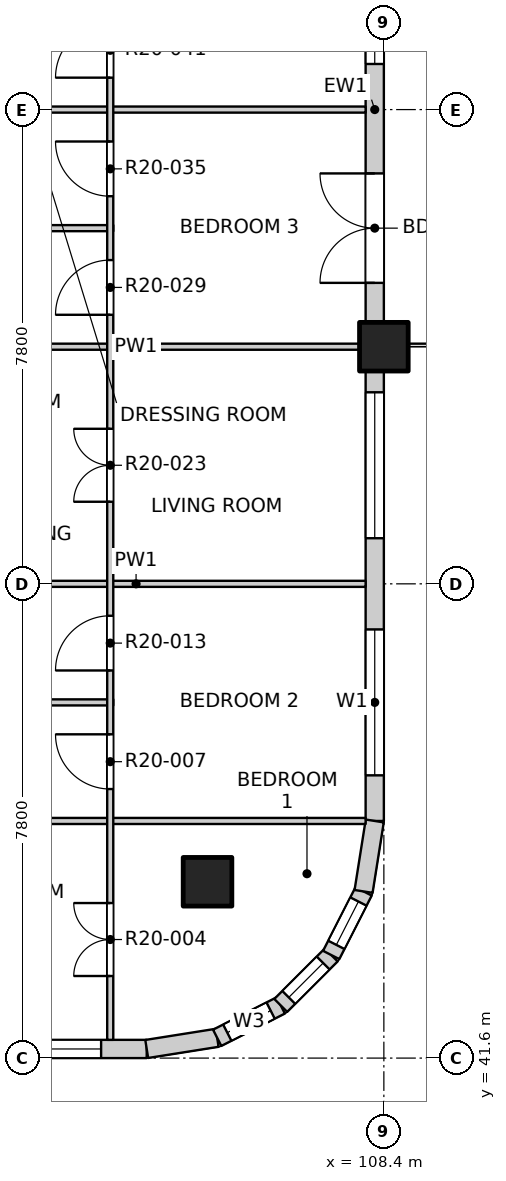
"""IFC4 building model, lengths in metres.
Left out: names, types, materials, properties, quantities, classifications, styles, units other than length and angle.
Written with IfcOpenShell. Run it as: python <this file> out.ifc"""

import sys

from ifc_helpers import new_model, si_unit, direction, frame, frame_2d, origin, origin_2d, place, context, subcontext, project, spatial, rectangle, extrude, element, fill, save


model = new_model("IFC4")
c1 = context("Model", 3, precision=1e-05, world=origin(), true_north=direction((0.0, 1.0)))
c2 = subcontext(c1, "Body", "Model", "MODEL_VIEW")
j1 = project(units=[si_unit("LENGTHUNIT", "METRE"), si_unit("PLANEANGLEUNIT", "RADIAN")], contexts=[c1])
p1 = place(None, origin())
s1 = spatial("IfcSite", under=j1, at=p1, CompositionType="ELEMENT")
p2 = place(p1, origin())
s2 = spatial("IfcBuilding", under=s1, at=p2, CompositionType="ELEMENT")
p3 = place(p2, frame((0.0, 0.0, 210.9)))
s3 = spatial("IfcBuildingStorey", under=s2, at=p3, CompositionType="ELEMENT", Elevation=210.9)
for number, where, z_axis, x_axis in (
    (1, (105.5, 44.5, -0.25), (0.0, 0.0, 1.0), (1.0, 0.0, 0.0)),
    (2, (108.4, 53.3, -0.25), (0.0, 0.0, 1.0), (1.0, 0.0, 0.0)),
):
    element("IfcColumn", number, at=place(p3, frame(where, z_axis=z_axis, x_axis=x_axis)), inside=s3, PredefinedType="COLUMN", context=c2, shape_type="SweptSolid", body=[
        extrude(rectangle(XDim=0.8, YDim=0.8, at=origin_2d()), origin(), (0.0, 0.0, 1.0), 3.4),
    ])
p4 = place(p3, frame((97.1, 41.75, 0.0), z_axis=(0.0, 0.0, 1.0), x_axis=(1.0, 0.0, 0.0)))
e3 = element("IfcWall", 3, at=p4, inside=s3, PredefinedType="SOLIDWALL", context=c2, shape_type="SweptSolid", body=[
    extrude(rectangle(XDim=7.4, YDim=0.3, at=frame_2d((3.7, 0.0))), origin(), (0.0, 0.0, 1.0), 2.7),
])
p5 = place(p4, frame((0.35, 0.0, 0.9)))
e4 = element("IfcOpeningElement", 4, at=p5, cuts=e3, PredefinedType="OPENING", context=c2, shape_type="SweptSolid", body=[
    extrude(rectangle(XDim=2.4, YDim=1.8, at=frame_2d((1.2, 0.9))), frame((0.0, 0.16, 0.0), z_axis=(0.0, -1.0, 0.0), x_axis=(1.0, 0.0, 0.0)), (0.0, 0.0, 1.0), 0.32),
])
p6 = place(p4, frame((4.25, 0.0, 0.9)))
e5 = element("IfcOpeningElement", 5, at=p6, cuts=e3, PredefinedType="OPENING", context=c2, shape_type="SweptSolid", body=[
    extrude(rectangle(XDim=2.4, YDim=1.8, at=frame_2d((1.2, 0.9))), frame((0.0, 0.16, 0.0), z_axis=(0.0, -1.0, 0.0), x_axis=(1.0, 0.0, 0.0)), (0.0, 0.0, 1.0), 0.32),
])
p7 = place(p3, frame((108.25, 45.5, 0.0), z_axis=(0.0, 0.0, 1.0), x_axis=(0.0, 1.0, 0.0)))
e6 = element("IfcWall", 6, at=p7, inside=s3, PredefinedType="SOLIDWALL", context=c2, shape_type="SweptSolid", body=[
    extrude(rectangle(XDim=7.4, YDim=0.3, at=frame_2d((3.7, 0.0))), origin(), (0.0, 0.0, 1.0), 2.7),
])
p8 = place(p7, frame((0.75, 0.0, 0.9)))
e7 = element("IfcOpeningElement", 7, at=p8, cuts=e6, PredefinedType="OPENING", context=c2, shape_type="SweptSolid", body=[
    extrude(rectangle(XDim=2.4, YDim=1.8, at=frame_2d((1.2, 0.9))), frame((0.0, 0.16, 0.0), z_axis=(0.0, -1.0, 0.0), x_axis=(1.0, 0.0, 0.0)), (0.0, 0.0, 1.0), 0.32),
])
p9 = place(p7, frame((4.65, 0.0, 0.9)))
e8 = element("IfcOpeningElement", 8, at=p9, cuts=e6, PredefinedType="OPENING", context=c2, shape_type="SweptSolid", body=[
    extrude(rectangle(XDim=2.4, YDim=1.8, at=frame_2d((1.2, 0.9))), frame((0.0, 0.16, 0.0), z_axis=(0.0, -1.0, 0.0), x_axis=(1.0, 0.0, 0.0)), (0.0, 0.0, 1.0), 0.32),
])
p10 = place(p3, frame((108.25, 53.7, 0.0), z_axis=(0.0, 0.0, 1.0), x_axis=(0.0, 1.0, 0.0)))
e9 = element("IfcWall", 9, at=p10, inside=s3, PredefinedType="SOLIDWALL", context=c2, shape_type="SweptSolid", body=[
    extrude(rectangle(XDim=7.0, YDim=0.3, at=frame_2d((3.5, 0.0))), origin(), (0.0, 0.0, 1.0), 2.7),
])
p11 = place(p10, frame((0.65, 0.0, 0.0)))
e10 = element("IfcOpeningElement", 10, at=p11, cuts=e9, PredefinedType="OPENING", context=c2, shape_type="SweptSolid", body=[
    extrude(rectangle(XDim=1.8, YDim=2.4, at=frame_2d((0.9, 1.2))), frame((0.0, 0.16, 0.0), z_axis=(0.0, -1.0, 0.0), x_axis=(1.0, 0.0, 0.0)), (0.0, 0.0, 1.0), 0.32),
])
p12 = place(p10, frame((4.25, 0.0, 0.9)))
e11 = element("IfcOpeningElement", 11, at=p12, cuts=e9, PredefinedType="OPENING", context=c2, shape_type="SweptSolid", body=[
    extrude(rectangle(XDim=2.4, YDim=1.8, at=frame_2d((1.2, 0.9))), frame((0.0, 0.16, 0.0), z_axis=(0.0, -1.0, 0.0), x_axis=(1.0, 0.0, 0.0)), (0.0, 0.0, 1.0), 0.32),
])
p13 = place(p3, frame((104.5, 41.75, 0.0), z_axis=(0.0, 0.0, 1.0), x_axis=(0.987678452879, 0.156496880861, 0.0)))
e12 = element("IfcWall", 12, at=p13, inside=s3, PredefinedType="SOLIDWALL", context=c2, shape_type="SweptSolid", body=[
    extrude(rectangle(XDim=1.173, YDim=0.3, at=frame_2d((0.586, 0.0))), origin(), (0.0, 0.0, 1.0), 2.7),
])
p14 = place(p3, frame((105.659, 41.934, 0.0), z_axis=(0.0, 0.0, 1.0), x_axis=(0.890988677504, 0.454025524128, 0.0)))
e13 = element("IfcWall", 13, at=p14, inside=s3, PredefinedType="SOLIDWALL", context=c2, shape_type="SweptSolid", body=[
    extrude(rectangle(XDim=1.173, YDim=0.3, at=frame_2d((0.587, 0.0))), origin(), (0.0, 0.0, 1.0), 2.7),
])
p15 = place(p14, frame((0.187, 0.0, 0.9)))
e14 = element("IfcOpeningElement", 14, at=p15, cuts=e13, PredefinedType="OPENING", context=c2, shape_type="SweptSolid", body=[
    extrude(rectangle(XDim=0.8, YDim=1.2, at=frame_2d((0.4, 0.6))), frame((0.0, 0.16, 0.0), z_axis=(0.0, -1.0, 0.0), x_axis=(1.0, 0.0, 0.0)), (0.0, 0.0, 1.0), 0.32),
])
p16 = place(p3, frame((106.704, 42.466, 0.0), z_axis=(0.0, 0.0, 1.0), x_axis=(0.707106781187, 0.707106781187, 0.0)))
e15 = element("IfcWall", 15, at=p16, inside=s3, PredefinedType="SOLIDWALL", context=c2, shape_type="SweptSolid", body=[
    extrude(rectangle(XDim=1.173, YDim=0.3, at=frame_2d((0.586, 0.0))), origin(), (0.0, 0.0, 1.0), 2.7),
])
p17 = place(p16, frame((0.187, 0.0, 0.9)))
e16 = element("IfcOpeningElement", 16, at=p17, cuts=e15, PredefinedType="OPENING", context=c2, shape_type="SweptSolid", body=[
    extrude(rectangle(XDim=0.8, YDim=1.2, at=frame_2d((0.4, 0.6))), frame((0.0, 0.16, 0.0), z_axis=(0.0, -1.0, 0.0), x_axis=(1.0, 0.0, 0.0)), (0.0, 0.0, 1.0), 0.32),
])
p18 = place(p3, frame((107.534, 43.296, 0.0), z_axis=(0.0, 0.0, 1.0), x_axis=(0.454025524128, 0.890988677504, 0.0)))
e17 = element("IfcWall", 17, at=p18, inside=s3, PredefinedType="SOLIDWALL", context=c2, shape_type="SweptSolid", body=[
    extrude(rectangle(XDim=1.173, YDim=0.3, at=frame_2d((0.587, 0.0))), origin(), (0.0, 0.0, 1.0), 2.7),
])
p19 = place(p18, frame((0.187, 0.0, 0.9)))
e18 = element("IfcOpeningElement", 18, at=p19, cuts=e17, PredefinedType="OPENING", context=c2, shape_type="SweptSolid", body=[
    extrude(rectangle(XDim=0.8, YDim=1.2, at=frame_2d((0.4, 0.6))), frame((0.0, 0.16, 0.0), z_axis=(0.0, -1.0, 0.0), x_axis=(1.0, 0.0, 0.0)), (0.0, 0.0, 1.0), 0.32),
])
p20 = place(p3, frame((108.066, 44.341, 0.0), z_axis=(0.0, 0.0, 1.0), x_axis=(0.156496880861, 0.987678452879, 0.0)))
e19 = element("IfcWall", 19, at=p20, inside=s3, PredefinedType="SOLIDWALL", context=c2, shape_type="SweptSolid", body=[
    extrude(rectangle(XDim=1.173, YDim=0.3, at=frame_2d((0.586, 0.0))), origin(), (0.0, 0.0, 1.0), 2.7),
])
p21 = place(p3, frame((96.625, 45.5, 0.0), z_axis=(0.0, 0.0, 1.0), x_axis=(1.0, 0.0, 0.0)))
e20 = element("IfcWall", 20, at=p21, inside=s3, PredefinedType="PARTITIONING", context=c2, shape_type="SweptSolid", body=[
    extrude(rectangle(XDim=11.475, YDim=0.1, at=frame_2d((5.738, 0.0))), origin(), (0.0, 0.0, 1.0), 3.15),
])
p22 = place(p21, frame((2.61, 0.0, 0.0)))
e21 = element("IfcOpeningElement", 21, at=p22, cuts=e20, PredefinedType="OPENING", context=c2, shape_type="SweptSolid", body=[
    extrude(rectangle(XDim=0.9, YDim=2.1, at=frame_2d((0.45, 1.05))), frame((0.0, 0.06, 0.0), z_axis=(0.0, -1.0, 0.0), x_axis=(1.0, 0.0, 0.0)), (0.0, 0.0, 1.0), 0.12),
])
p23 = place(p3, frame((100.55, 47.45, 0.0), z_axis=(0.0, 0.0, 1.0), x_axis=(1.0, 0.0, 0.0)))
e22 = element("IfcWall", 22, at=p23, inside=s3, PredefinedType="PARTITIONING", context=c2, shape_type="SweptSolid", body=[
    extrude(rectangle(XDim=3.4, YDim=0.1, at=frame_2d((1.7, 0.0))), origin(), (0.0, 0.0, 1.0), 3.15),
])
for number, where, z_axis, x_axis in (
    (23, (100.55, 49.4, 0.0), (0.0, 0.0, 1.0), (1.0, 0.0, 0.0)),
    (24, (100.55, 53.3, 0.0), (0.0, 0.0, 1.0), (1.0, 0.0, 0.0)),
):
    element("IfcWall", number, at=place(p3, frame(where, z_axis=z_axis, x_axis=x_axis)), inside=s3, PredefinedType="PARTITIONING", context=c2, shape_type="SweptSolid", body=[
        extrude(rectangle(XDim=7.55, YDim=0.1, at=frame_2d((3.775, 0.0))), origin(), (0.0, 0.0, 1.0), 3.15),
    ])
p24 = place(p3, frame((100.55, 55.25, 0.0), z_axis=(0.0, 0.0, 1.0), x_axis=(1.0, 0.0, 0.0)))
e25 = element("IfcWall", 25, at=p24, inside=s3, PredefinedType="PARTITIONING", context=c2, shape_type="SweptSolid", body=[
    extrude(rectangle(XDim=3.4, YDim=0.1, at=frame_2d((1.7, 0.0))), origin(), (0.0, 0.0, 1.0), 3.15),
])
p25 = place(p3, frame((100.55, 57.2, 0.0), z_axis=(0.0, 0.0, 1.0), x_axis=(1.0, 0.0, 0.0)))
e26 = element("IfcWall", 26, at=p25, inside=s3, PredefinedType="PARTITIONING", context=c2, shape_type="SweptSolid", body=[
    extrude(rectangle(XDim=7.55, YDim=0.1, at=frame_2d((3.775, 0.0))), origin(), (0.0, 0.0, 1.0), 3.15),
])
p26 = place(p3, frame((103.9, 41.9, 0.0), z_axis=(0.0, 0.0, 1.0), x_axis=(0.0, 1.0, 0.0)))
e27 = element("IfcWall", 27, at=p26, inside=s3, PredefinedType="PARTITIONING", context=c2, shape_type="SweptSolid", body=[
    extrude(rectangle(XDim=19.1, YDim=0.1, at=frame_2d((9.55, 0.0))), origin(), (0.0, 0.0, 1.0), 3.15),
])
p27 = place(p26, frame((1.05, 0.0, 0.0)))
e28 = element("IfcOpeningElement", 28, at=p27, cuts=e27, PredefinedType="OPENING", context=c2, shape_type="SweptSolid", body=[
    extrude(rectangle(XDim=1.2, YDim=2.1, at=frame_2d((0.6, 1.05))), frame((0.0, 0.06, 0.0), z_axis=(0.0, -1.0, 0.0), x_axis=(1.0, 0.0, 0.0)), (0.0, 0.0, 1.0), 0.12),
])
p28 = place(p26, frame((4.125, 0.0, 0.0)))
e29 = element("IfcOpeningElement", 29, at=p28, cuts=e27, PredefinedType="OPENING", context=c2, shape_type="SweptSolid", body=[
    extrude(rectangle(XDim=0.9, YDim=2.1, at=frame_2d((0.45, 1.05))), frame((0.0, 0.06, 0.0), z_axis=(0.0, -1.0, 0.0), x_axis=(1.0, 0.0, 0.0)), (0.0, 0.0, 1.0), 0.12),
])
p29 = place(p26, frame((6.075, 0.0, 0.0)))
e30 = element("IfcOpeningElement", 30, at=p29, cuts=e27, PredefinedType="OPENING", context=c2, shape_type="SweptSolid", body=[
    extrude(rectangle(XDim=0.9, YDim=2.1, at=frame_2d((0.45, 1.05))), frame((0.0, 0.06, 0.0), z_axis=(0.0, -1.0, 0.0), x_axis=(1.0, 0.0, 0.0)), (0.0, 0.0, 1.0), 0.12),
])
p30 = place(p26, frame((8.85, 0.0, 0.0)))
e31 = element("IfcOpeningElement", 31, at=p30, cuts=e27, PredefinedType="OPENING", context=c2, shape_type="SweptSolid", body=[
    extrude(rectangle(XDim=1.2, YDim=2.1, at=frame_2d((0.6, 1.05))), frame((0.0, 0.06, 0.0), z_axis=(0.0, -1.0, 0.0), x_axis=(1.0, 0.0, 0.0)), (0.0, 0.0, 1.0), 0.12),
])
p31 = place(p26, frame((11.925, 0.0, 0.0)))
e32 = element("IfcOpeningElement", 32, at=p31, cuts=e27, PredefinedType="OPENING", context=c2, shape_type="SweptSolid", body=[
    extrude(rectangle(XDim=0.9, YDim=2.1, at=frame_2d((0.45, 1.05))), frame((0.0, 0.06, 0.0), z_axis=(0.0, -1.0, 0.0), x_axis=(1.0, 0.0, 0.0)), (0.0, 0.0, 1.0), 0.12),
])
p32 = place(p26, frame((13.875, 0.0, 0.0)))
e33 = element("IfcOpeningElement", 33, at=p32, cuts=e27, PredefinedType="OPENING", context=c2, shape_type="SweptSolid", body=[
    extrude(rectangle(XDim=0.9, YDim=2.1, at=frame_2d((0.45, 1.05))), frame((0.0, 0.06, 0.0), z_axis=(0.0, -1.0, 0.0), x_axis=(1.0, 0.0, 0.0)), (0.0, 0.0, 1.0), 0.12),
])
p33 = place(p26, frame((15.825, 0.0, 0.0)))
e34 = element("IfcOpeningElement", 34, at=p33, cuts=e27, PredefinedType="OPENING", context=c2, shape_type="SweptSolid", body=[
    extrude(rectangle(XDim=0.9, YDim=2.1, at=frame_2d((0.45, 1.05))), frame((0.0, 0.06, 0.0), z_axis=(0.0, -1.0, 0.0), x_axis=(1.0, 0.0, 0.0)), (0.0, 0.0, 1.0), 0.12),
])
p34 = place(p26, frame((17.775, 0.0, 0.0)))
e35 = element("IfcOpeningElement", 35, at=p34, cuts=e27, PredefinedType="OPENING", context=c2, shape_type="SweptSolid", body=[
    extrude(rectangle(XDim=0.9, YDim=2.1, at=frame_2d((0.45, 1.05))), frame((0.0, 0.06, 0.0), z_axis=(0.0, -1.0, 0.0), x_axis=(1.0, 0.0, 0.0)), (0.0, 0.0, 1.0), 0.12),
])
p35 = place(p6, origin())
e36 = element("IfcWindow", 36, at=p35, inside=s3, PartitioningType="DOUBLE_PANEL_VERTICAL", PredefinedType="WINDOW", context=c2, shape_type="SweptSolid", body=[
    extrude(rectangle(XDim=2.4, YDim=1.8, at=frame_2d((1.2, 0.9))), frame((0.0, 0.03, 0.0), z_axis=(0.0, -1.0, 0.0), x_axis=(1.0, 0.0, 0.0)), (0.0, 0.0, 1.0), 0.06),
])
fill(e5, e36)
p36 = place(p8, origin())
e37 = element("IfcWindow", 37, at=p36, inside=s3, PartitioningType="DOUBLE_PANEL_VERTICAL", PredefinedType="WINDOW", context=c2, shape_type="SweptSolid", body=[
    extrude(rectangle(XDim=2.4, YDim=1.8, at=frame_2d((1.2, 0.9))), frame((0.0, 0.03, 0.0), z_axis=(0.0, -1.0, 0.0), x_axis=(1.0, 0.0, 0.0)), (0.0, 0.0, 1.0), 0.06),
])
fill(e7, e37)
p37 = place(p9, origin())
e38 = element("IfcWindow", 38, at=p37, inside=s3, PartitioningType="DOUBLE_PANEL_VERTICAL", PredefinedType="WINDOW", context=c2, shape_type="SweptSolid", body=[
    extrude(rectangle(XDim=2.4, YDim=1.8, at=frame_2d((1.2, 0.9))), frame((0.0, 0.03, 0.0), z_axis=(0.0, -1.0, 0.0), x_axis=(1.0, 0.0, 0.0)), (0.0, 0.0, 1.0), 0.06),
])
fill(e8, e38)
p38 = place(p11, origin())
e39 = element("IfcDoor", 39, at=p38, inside=s3, OperationType="DOUBLE_DOOR_SINGLE_SWING", PredefinedType="DOOR", context=c2, shape_type="SweptSolid", body=[
    extrude(rectangle(XDim=1.8, YDim=2.4, at=frame_2d((0.9, 1.2))), frame((0.0, 0.025, 0.0), z_axis=(0.0, -1.0, 0.0), x_axis=(1.0, 0.0, 0.0)), (0.0, 0.0, 1.0), 0.05),
])
fill(e10, e39)
p39 = place(p12, origin())
e40 = element("IfcWindow", 40, at=p39, inside=s3, PartitioningType="DOUBLE_PANEL_VERTICAL", PredefinedType="WINDOW", context=c2, shape_type="SweptSolid", body=[
    extrude(rectangle(XDim=2.4, YDim=1.8, at=frame_2d((1.2, 0.9))), frame((0.0, 0.03, 0.0), z_axis=(0.0, -1.0, 0.0), x_axis=(1.0, 0.0, 0.0)), (0.0, 0.0, 1.0), 0.06),
])
fill(e11, e40)
p40 = place(p15, origin())
e41 = element("IfcWindow", 41, at=p40, inside=s3, PartitioningType="SINGLE_PANEL", PredefinedType="WINDOW", context=c2, shape_type="SweptSolid", body=[
    extrude(rectangle(XDim=0.8, YDim=1.2, at=frame_2d((0.4, 0.6))), frame((0.0, 0.03, 0.0), z_axis=(0.0, -1.0, 0.0), x_axis=(1.0, 0.0, 0.0)), (0.0, 0.0, 1.0), 0.06),
])
fill(e14, e41)
p41 = place(p17, origin())
e42 = element("IfcWindow", 42, at=p41, inside=s3, PartitioningType="SINGLE_PANEL", PredefinedType="WINDOW", context=c2, shape_type="SweptSolid", body=[
    extrude(rectangle(XDim=0.8, YDim=1.2, at=frame_2d((0.4, 0.6))), frame((0.0, 0.03, 0.0), z_axis=(0.0, -1.0, 0.0), x_axis=(1.0, 0.0, 0.0)), (0.0, 0.0, 1.0), 0.06),
])
fill(e16, e42)
p42 = place(p19, origin())
e43 = element("IfcWindow", 43, at=p42, inside=s3, PartitioningType="SINGLE_PANEL", PredefinedType="WINDOW", context=c2, shape_type="SweptSolid", body=[
    extrude(rectangle(XDim=0.8, YDim=1.2, at=frame_2d((0.4, 0.6))), frame((0.0, 0.03, 0.0), z_axis=(0.0, -1.0, 0.0), x_axis=(1.0, 0.0, 0.0)), (0.0, 0.0, 1.0), 0.06),
])
fill(e18, e43)
p43 = place(p27, origin())
e44 = element("IfcDoor", 44, at=p43, inside=s3, OperationType="DOUBLE_DOOR_SINGLE_SWING", PredefinedType="DOOR", context=c2, shape_type="SweptSolid", body=[
    extrude(rectangle(XDim=1.2, YDim=2.1, at=frame_2d((0.6, 1.05))), frame((0.0, 0.025, 0.0), z_axis=(0.0, -1.0, 0.0), x_axis=(1.0, 0.0, 0.0)), (0.0, 0.0, 1.0), 0.05),
])
fill(e28, e44)
p44 = place(p28, origin())
e45 = element("IfcDoor", 45, at=p44, inside=s3, OperationType="SINGLE_SWING_RIGHT", PredefinedType="DOOR", context=c2, shape_type="SweptSolid", body=[
    extrude(rectangle(XDim=0.9, YDim=2.1, at=frame_2d((0.45, 1.05))), frame((0.0, 0.025, 0.0), z_axis=(0.0, -1.0, 0.0), x_axis=(1.0, 0.0, 0.0)), (0.0, 0.0, 1.0), 0.05),
])
fill(e29, e45)
p45 = place(p29, origin())
e46 = element("IfcDoor", 46, at=p45, inside=s3, OperationType="SINGLE_SWING_LEFT", PredefinedType="DOOR", context=c2, shape_type="SweptSolid", body=[
    extrude(rectangle(XDim=0.9, YDim=2.1, at=frame_2d((0.45, 1.05))), frame((0.0, 0.025, 0.0), z_axis=(0.0, -1.0, 0.0), x_axis=(1.0, 0.0, 0.0)), (0.0, 0.0, 1.0), 0.05),
])
fill(e30, e46)
p46 = place(p30, origin())
e47 = element("IfcDoor", 47, at=p46, inside=s3, OperationType="DOUBLE_DOOR_SINGLE_SWING", PredefinedType="DOOR", context=c2, shape_type="SweptSolid", body=[
    extrude(rectangle(XDim=1.2, YDim=2.1, at=frame_2d((0.6, 1.05))), frame((0.0, 0.025, 0.0), z_axis=(0.0, -1.0, 0.0), x_axis=(1.0, 0.0, 0.0)), (0.0, 0.0, 1.0), 0.05),
])
fill(e31, e47)
p47 = place(p31, origin())
e48 = element("IfcDoor", 48, at=p47, inside=s3, OperationType="SINGLE_SWING_LEFT", PredefinedType="DOOR", context=c2, shape_type="SweptSolid", body=[
    extrude(rectangle(XDim=0.9, YDim=2.1, at=frame_2d((0.45, 1.05))), frame((0.0, 0.025, 0.0), z_axis=(0.0, -1.0, 0.0), x_axis=(1.0, 0.0, 0.0)), (0.0, 0.0, 1.0), 0.05),
])
fill(e32, e48)
p48 = place(p32, origin())
e49 = element("IfcDoor", 49, at=p48, inside=s3, OperationType="SINGLE_SWING_RIGHT", PredefinedType="DOOR", context=c2, shape_type="SweptSolid", body=[
    extrude(rectangle(XDim=0.9, YDim=2.1, at=frame_2d((0.45, 1.05))), frame((0.0, 0.025, 0.0), z_axis=(0.0, -1.0, 0.0), x_axis=(1.0, 0.0, 0.0)), (0.0, 0.0, 1.0), 0.05),
])
fill(e33, e49)
p49 = place(p33, origin())
e50 = element("IfcDoor", 50, at=p49, inside=s3, OperationType="SINGLE_SWING_LEFT", PredefinedType="DOOR", context=c2, shape_type="SweptSolid", body=[
    extrude(rectangle(XDim=0.9, YDim=2.1, at=frame_2d((0.45, 1.05))), frame((0.0, 0.025, 0.0), z_axis=(0.0, -1.0, 0.0), x_axis=(1.0, 0.0, 0.0)), (0.0, 0.0, 1.0), 0.05),
])
fill(e34, e50)
save(model, sys.argv[1])
